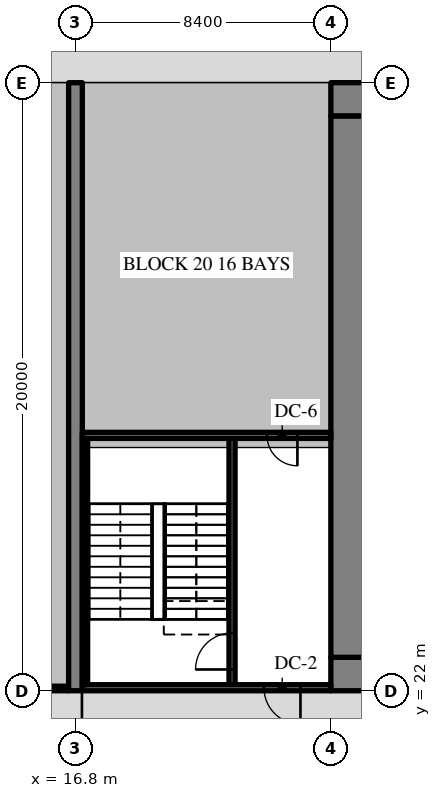
"""IFC4 building model, lengths in metres.
Left out: names, types, materials, properties, quantities, classifications, styles, units other than length and angle.
Written with IfcOpenShell. Run it as: python <this file> out.ifc"""

import sys

from ifc_helpers import new_model, si_unit, direction, frame, frame_2d, origin, place, context, subcontext, project, spatial, rectangle, extrude, source, transform, mapped, element, fill, save


model = new_model("IFC4")
c1 = context("Model", 3, precision=1e-05, world=origin(), true_north=direction((0.0, 1.0)))
c2 = subcontext(c1, "Body", "Model", "MODEL_VIEW")
j1 = project(units=[si_unit("LENGTHUNIT", "METRE"), si_unit("PLANEANGLEUNIT", "RADIAN")], contexts=[c1])
p1 = place(None, origin())
s1 = spatial("IfcSite", under=j1, at=p1, CompositionType="ELEMENT")
p2 = place(p1, origin())
s2 = spatial("IfcBuilding", under=s1, at=p2, CompositionType="ELEMENT")
p3 = place(p2, frame((0.0, 0.0, -13.5)))
s3 = spatial("IfcBuildingStorey", under=s2, at=p3, CompositionType="ELEMENT", Elevation=-13.5)
m1 = source(origin(), c2, "Body", "SweptSolid", [
    extrude(rectangle(XDim=50.4, YDim=1.1, at=frame_2d((25.2, 0.0))), origin(), (0.0, 0.0, 1.0), 4.52),
])
p4 = place(p3, frame((25.2, 22.55, -0.3), z_axis=(0.0, 0.0, 1.0), x_axis=(1.0, 0.0, 0.0)))
e1 = element("IfcWall", 1, at=p4, inside=s3, PredefinedType="SHEAR", context=c2, shape_type="MappedRepresentation", body=[
    mapped(m1, transform((0.0, 0.0, 0.0), scale=1.0)),
])
m2 = source(origin(), c2, "Body", "SweptSolid", [
    extrude(rectangle(XDim=1.8, YDim=2.1, at=frame_2d((0.9, 1.05))), frame((0.0, 0.56, 0.0), z_axis=(0.0, -1.0, 0.0), x_axis=(1.0, 0.0, 0.0)), (0.0, 0.0, 1.0), 1.12),
])
p5 = place(p4, frame((15.9, 0.0, 0.0)))
e2 = element("IfcOpeningElement", 2, at=p5, cuts=e1, PredefinedType="OPENING", context=c2, shape_type="MappedRepresentation", body=[
    mapped(m2, transform((0.0, 0.0, 0.0), scale=1.0)),
])
m3 = source(origin(), c2, "Body", "SweptSolid", [
    extrude(rectangle(XDim=1.2, YDim=2.1, at=frame_2d((0.6, 1.05))), frame((0.0, 0.56, 0.0), z_axis=(0.0, -1.0, 0.0), x_axis=(1.0, 0.0, 0.0)), (0.0, 0.0, 1.0), 1.12),
])
p6 = place(p4, frame((27.0, 0.0, 0.0)))
e3 = element("IfcOpeningElement", 3, at=p6, cuts=e1, PredefinedType="OPENING", context=c2, shape_type="MappedRepresentation", body=[
    mapped(m3, transform((0.0, 0.0, 0.0), scale=1.0)),
])
m4 = source(origin(), c2, "Body", "SweptSolid", [
    extrude(rectangle(XDim=0.9, YDim=2.1, at=frame_2d((0.45, 1.05))), frame((0.0, 0.56, 0.0), z_axis=(0.0, -1.0, 0.0), x_axis=(1.0, 0.0, 0.0)), (0.0, 0.0, 1.0), 1.12),
])
p7 = place(p4, frame((33.75, 0.0, 0.0)))
e4 = element("IfcOpeningElement", 4, at=p7, cuts=e1, PredefinedType="OPENING", context=c2, shape_type="MappedRepresentation", body=[
    mapped(m4, transform((0.0, 0.0, 0.0), scale=1.0)),
])
p8 = place(p4, frame((30.75, 0.0, 0.0)))
e5 = element("IfcOpeningElement", 5, at=p8, cuts=e1, PredefinedType="OPENING", context=c2, shape_type="MappedRepresentation", body=[
    mapped(m4, transform((0.0, 0.0, 0.0), scale=1.0)),
])
p9 = place(p4, frame((38.25, 0.0, 0.0)))
e6 = element("IfcOpeningElement", 6, at=p9, cuts=e1, PredefinedType="OPENING", context=c2, shape_type="MappedRepresentation", body=[
    mapped(m4, transform((0.0, 0.0, 0.0), scale=1.0)),
])
p10 = place(p4, frame((6.425, 0.0, 0.0)))
e7 = element("IfcOpeningElement", 7, at=p10, cuts=e1, PredefinedType="OPENING", context=c2, shape_type="MappedRepresentation", body=[
    mapped(m3, transform((0.0, 0.0, 0.0), scale=1.0)),
])
p11 = place(p4, frame((47.675, 0.0, 0.0)))
e8 = element("IfcOpeningElement", 8, at=p11, cuts=e1, PredefinedType="OPENING", context=c2, shape_type="MappedRepresentation", body=[
    mapped(m3, transform((0.0, 0.0, 0.0), scale=1.0)),
])
p12 = place(p3, frame((25.2, 41.45, -0.3), z_axis=(0.0, 0.0, 1.0), x_axis=(1.0, 0.0, 0.0)))
e9 = element("IfcWall", 9, at=p12, inside=s3, PredefinedType="SHEAR", context=c2, shape_type="MappedRepresentation", body=[
    mapped(m1, transform((0.0, 0.0, 0.0), scale=1.0)),
])
m5 = source(origin(), c2, "Body", "SweptSolid", [
    extrude(rectangle(XDim=17.8, YDim=1.1, at=frame_2d((8.9, 0.0))), origin(), (0.0, 0.0, 1.0), 4.52),
])
p13 = place(p3, frame((25.75, 23.1, -0.3), z_axis=(0.0, 0.0, 1.0), x_axis=(0.0, 1.0, 0.0)))
e10 = element("IfcWall", 10, at=p13, inside=s3, PredefinedType="SHEAR", context=c2, shape_type="MappedRepresentation", body=[
    mapped(m5, transform((0.0, 0.0, 0.0), scale=1.0)),
])
m6 = source(origin(), c2, "Body", "SweptSolid", [
    extrude(rectangle(XDim=20.0, YDim=0.45, at=frame_2d((10.0, 0.0))), origin(), (0.0, 0.0, 1.0), 4.52),
])
p14 = place(p3, frame((16.8, 22.0, -0.3), z_axis=(0.0, 0.0, 1.0), x_axis=(0.0, 1.0, 0.0)))
e11 = element("IfcWall", 11, at=p14, inside=s3, PredefinedType="SHEAR", context=c2, shape_type="MappedRepresentation", body=[
    mapped(m6, transform((0.0, 0.0, 0.0), scale=1.0)),
])
m7 = source(origin(), c2, "Body", "SweptSolid", [
    extrude(rectangle(XDim=8.3, YDim=0.2, at=frame_2d((4.15, 0.0))), origin(), (0.0, 0.0, 1.0), 4.52),
])
p15 = place(p3, frame((21.95, 22.1, -0.3), z_axis=(0.0, 0.0, 1.0), x_axis=(0.0, 1.0, 0.0)))
e12 = element("IfcWall", 12, at=p15, inside=s3, PredefinedType="SOLIDWALL", context=c2, shape_type="MappedRepresentation", body=[
    mapped(m7, transform((0.0, 0.0, 0.0), scale=1.0)),
])
m8 = source(origin(), c2, "Body", "SweptSolid", [
    extrude(rectangle(XDim=1.2, YDim=2.1, at=frame_2d((0.6, 1.05))), frame((0.0, 0.11, 0.0), z_axis=(0.0, -1.0, 0.0), x_axis=(1.0, 0.0, 0.0)), (0.0, 0.0, 1.0), 0.22),
])
p16 = place(p15, frame((0.6, 0.0, 0.0)))
e13 = element("IfcOpeningElement", 13, at=p16, cuts=e12, PredefinedType="OPENING", context=c2, shape_type="MappedRepresentation", body=[
    mapped(m8, transform((0.0, 0.0, 0.0), scale=1.0)),
])
m9 = source(origin(), c2, "Body", "SweptSolid", [
    extrude(rectangle(XDim=8.175, YDim=0.2, at=frame_2d((4.087, 0.0))), origin(), (0.0, 0.0, 1.0), 4.52),
])
p17 = place(p3, frame((17.025, 22.1, -0.3), z_axis=(0.0, 0.0, 1.0), x_axis=(1.0, 0.0, 0.0)))
e14 = element("IfcWall", 14, at=p17, inside=s3, PredefinedType="SOLIDWALL", context=c2, shape_type="MappedRepresentation", body=[
    mapped(m9, transform((0.0, 0.0, 0.0), scale=1.0)),
])
p18 = place(p17, frame((5.975, 0.0, 0.0)))
e15 = element("IfcOpeningElement", 15, at=p18, cuts=e14, PredefinedType="OPENING", context=c2, shape_type="MappedRepresentation", body=[
    mapped(m8, transform((0.0, 0.0, 0.0), scale=1.0)),
])
p19 = place(p3, frame((17.025, 30.4, -0.3), z_axis=(0.0, 0.0, 1.0), x_axis=(1.0, 0.0, 0.0)))
e16 = element("IfcWall", 16, at=p19, inside=s3, PredefinedType="SOLIDWALL", context=c2, shape_type="MappedRepresentation", body=[
    mapped(m9, transform((0.0, 0.0, 0.0), scale=1.0)),
])
m10 = source(origin(), c2, "Body", "SweptSolid", [
    extrude(rectangle(XDim=1.0, YDim=2.1, at=frame_2d((0.5, 1.05))), frame((0.0, 0.11, 0.0), z_axis=(0.0, -1.0, 0.0), x_axis=(1.0, 0.0, 0.0)), (0.0, 0.0, 1.0), 0.22),
])
p20 = place(p19, frame((6.075, 0.0, 0.0)))
e17 = element("IfcOpeningElement", 17, at=p20, cuts=e16, PredefinedType="OPENING", context=c2, shape_type="MappedRepresentation", body=[
    mapped(m10, transform((0.0, 0.0, 0.0), scale=1.0)),
])
m11 = source(origin(), c2, "Body", "SweptSolid", [
    extrude(rectangle(XDim=8.1, YDim=0.175, at=frame_2d((4.05, 0.0))), origin(), (0.0, 0.0, 1.0), 4.52),
])
p21 = place(p3, frame((17.112, 22.2, -0.3), z_axis=(0.0, 0.0, 1.0), x_axis=(0.0, 1.0, 0.0)))
e18 = element("IfcWall", 18, at=p21, inside=s3, PredefinedType="SOLIDWALL", context=c2, shape_type="MappedRepresentation", body=[
    mapped(m11, transform((0.0, 0.0, 0.0), scale=1.0)),
])
m12 = source(origin(), c2, "Body", "SweptSolid", [
    extrude(rectangle(XDim=7.95, YDim=0.15, at=frame_2d((3.975, 0.0))), origin(), (0.0, 0.0, 1.0), 4.22),
])
p22 = place(p3, frame((8.625, 22.075, 0.0), z_axis=(0.0, 0.0, 1.0), x_axis=(1.0, 0.0, 0.0)))
e19 = element("IfcWall", 19, at=p22, inside=s3, PredefinedType="PARTITIONING", context=c2, shape_type="MappedRepresentation", body=[
    mapped(m12, transform((0.0, 0.0, 0.0), scale=1.0)),
])
m13 = source(origin(), c2, "Body", "SweptSolid", [
    extrude(rectangle(XDim=1.2, YDim=2.1, at=frame_2d((0.6, 1.05))), frame((0.0, 0.025, 0.0), z_axis=(0.0, -1.0, 0.0), x_axis=(1.0, 0.0, 0.0)), (0.0, 0.0, 1.0), 0.05),
])
p23 = place(p16, origin())
e20 = element("IfcDoor", 20, at=p23, inside=s3, OperationType="SINGLE_SWING_LEFT", PredefinedType="DOOR", context=c2, shape_type="MappedRepresentation", body=[
    mapped(m13, transform((0.0, 0.0, 0.0), scale=1.0)),
])
fill(e13, e20)
p24 = place(p18, origin())
e21 = element("IfcDoor", 21, at=p24, inside=s3, OperationType="SINGLE_SWING_RIGHT", PredefinedType="DOOR", context=c2, shape_type="MappedRepresentation", body=[
    mapped(m13, transform((0.0, 0.0, 0.0), scale=1.0)),
])
fill(e15, e21)
m14 = source(origin(), c2, "Body", "SweptSolid", [
    extrude(rectangle(XDim=1.0, YDim=2.1, at=frame_2d((0.5, 1.05))), frame((0.0, 0.025, 0.0), z_axis=(0.0, -1.0, 0.0), x_axis=(1.0, 0.0, 0.0)), (0.0, 0.0, 1.0), 0.05),
])
p25 = place(p20, origin())
e22 = element("IfcDoor", 22, at=p25, inside=s3, OperationType="SINGLE_SWING_RIGHT", PredefinedType="DOOR", context=c2, shape_type="MappedRepresentation", body=[
    mapped(m14, transform((0.0, 0.0, 0.0), scale=1.0)),
])
fill(e17, e22)
save(model, sys.argv[1])
